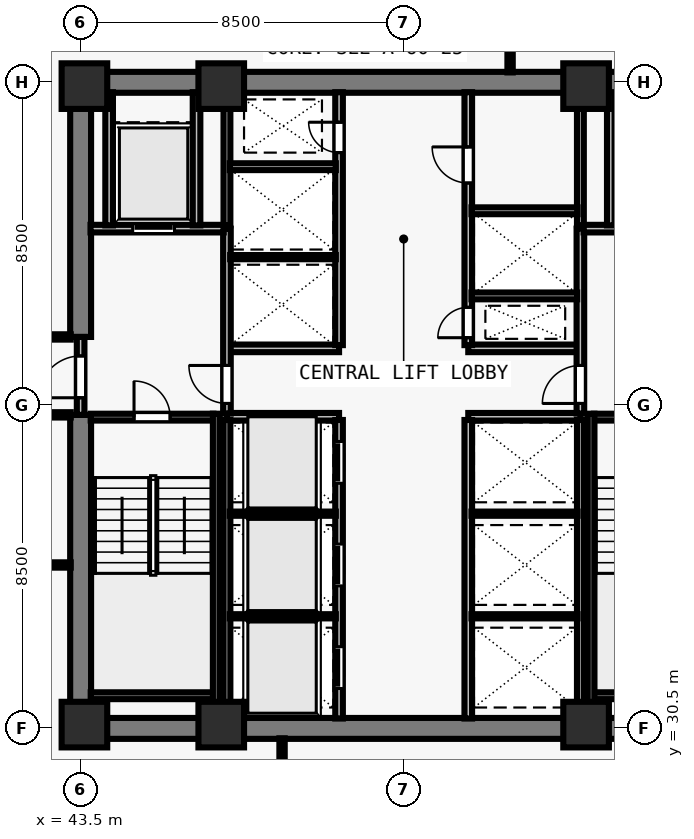
"""IFC4 building model, lengths in metres.
Left out: names, types, materials, properties, quantities, classifications, styles, units other than length and angle.
Written with IfcOpenShell. Run it as: python <this file> out.ifc"""

import sys

from ifc_helpers import new_model, si_unit, direction, frame, frame_2d, origin, origin_2d, place, context, subcontext, project, spatial, rectangle, extrude, element, fill, save


model = new_model("IFC4")
c1 = context("Model", 3, precision=1e-05, world=origin(), true_north=direction((0.0, 1.0)))
c2 = subcontext(c1, "Body", "Model", "MODEL_VIEW")
j1 = project(units=[si_unit("LENGTHUNIT", "METRE"), si_unit("PLANEANGLEUNIT", "RADIAN")], contexts=[c1])
p1 = place(None, origin())
s1 = spatial("IfcSite", under=j1, at=p1, CompositionType="ELEMENT")
p2 = place(p1, origin())
s2 = spatial("IfcBuilding", under=s1, at=p2, CompositionType="ELEMENT")
p3 = place(p2, frame((0.0, 0.0, 83.0)))
s3 = spatial("IfcBuildingStorey", under=s2, at=p3, CompositionType="ELEMENT", Elevation=83.0)
for number, where, z_axis, x_axis in (
    (1, (43.6, 30.6, 0.0), (0.0, 0.0, 1.0), (1.0, 0.0, 0.0)),
    (2, (47.2, 30.6, 0.0), (0.0, 0.0, 1.0), (1.0, 0.0, 0.0)),
    (3, (56.8, 30.6, 0.0), (0.0, 0.0, 1.0), (1.0, 0.0, 0.0)),
    (4, (43.6, 47.4, 0.0), (0.0, 0.0, 1.0), (1.0, 0.0, 0.0)),
    (5, (47.2, 47.4, 0.0), (0.0, 0.0, 1.0), (1.0, 0.0, 0.0)),
    (6, (56.8, 47.4, 0.0), (0.0, 0.0, 1.0), (1.0, 0.0, 0.0)),
):
    element("IfcColumn", number, at=place(p3, frame(where, z_axis=z_axis, x_axis=x_axis)), inside=s3, PredefinedType="COLUMN", context=c2, shape_type="SweptSolid", body=[
        extrude(rectangle(XDim=1.2, YDim=1.2, at=origin_2d()), origin(), (0.0, 0.0, 1.0), 3.5),
    ])
for number, where, z_axis, x_axis in (
    (7, (43.225, 30.5, 0.0), (0.0, 0.0, 1.0), (1.0, 0.0, 0.0)),
    (8, (43.225, 47.5, 0.0), (0.0, 0.0, 1.0), (1.0, 0.0, 0.0)),
):
    element("IfcWall", number, at=place(p3, frame(where, z_axis=z_axis, x_axis=x_axis)), inside=s3, PredefinedType="SHEAR", context=c2, shape_type="SweptSolid", body=[
        extrude(rectangle(XDim=17.55, YDim=0.55, at=frame_2d((8.775, 0.0))), origin(), (0.0, 0.0, 1.0), 3.28),
    ])
p4 = place(p3, frame((43.5, 30.765, 0.0), z_axis=(0.0, 0.0, 1.0), x_axis=(0.0, 1.0, 0.0)))
e9 = element("IfcWall", 9, at=p4, inside=s3, PredefinedType="SHEAR", context=c2, shape_type="SweptSolid", body=[
    extrude(rectangle(XDim=7.985, YDim=0.55, at=frame_2d((3.993, 0.0))), origin(), (0.0, 0.0, 1.0), 3.28),
])
p5 = place(p3, frame((43.5, 40.8, 0.0), z_axis=(0.0, 0.0, 1.0), x_axis=(0.0, 1.0, 0.0)))
e10 = element("IfcWall", 10, at=p5, inside=s3, PredefinedType="SHEAR", context=c2, shape_type="SweptSolid", body=[
    extrude(rectangle(XDim=6.435, YDim=0.55, at=frame_2d((3.218, 0.0))), origin(), (0.0, 0.0, 1.0), 3.28),
])
for number, where, z_axis, x_axis in (
    (11, (47.35, 38.7, 0.0), (0.0, 0.0, 1.0), (1.0, 0.0, 0.0)),
    (12, (47.35, 40.5, 0.0), (0.0, 0.0, 1.0), (1.0, 0.0, 0.0)),
    (13, (53.7, 38.7, 0.0), (0.0, 0.0, 1.0), (1.0, 0.0, 0.0)),
    (14, (53.7, 40.5, 0.0), (0.0, 0.0, 1.0), (1.0, 0.0, 0.0)),
):
    element("IfcWall", number, at=place(p3, frame(where, z_axis=z_axis, x_axis=x_axis)), inside=s3, PredefinedType="SOLIDWALL", context=c2, shape_type="SweptSolid", body=[
        extrude(rectangle(XDim=2.95, YDim=0.2, at=frame_2d((1.475, 0.0))), origin(), (0.0, 0.0, 1.0), 3.28),
    ])
p6 = place(p3, frame((50.3, 30.76, 0.0), z_axis=(0.0, 0.0, 1.0), x_axis=(0.0, 1.0, 0.0)))
e15 = element("IfcWall", 15, at=p6, inside=s3, PredefinedType="SOLIDWALL", context=c2, shape_type="SweptSolid", body=[
    extrude(rectangle(XDim=7.855, YDim=0.2, at=frame_2d((3.927, 0.0))), origin(), (0.0, 0.0, 1.0), 3.28),
])
p7 = place(p6, frame((0.79, 0.0, 0.0)))
e16 = element("IfcOpeningElement", 16, at=p7, cuts=e15, PredefinedType="OPENING", context=c2, shape_type="SweptSolid", body=[
    extrude(rectangle(XDim=1.1, YDim=2.2, at=frame_2d((0.55, 1.1))), frame((0.0, 0.11, 0.0), z_axis=(0.0, -1.0, 0.0), x_axis=(1.0, 0.0, 0.0)), (0.0, 0.0, 1.0), 0.22),
])
p8 = place(p6, frame((3.49, 0.0, 0.0)))
e17 = element("IfcOpeningElement", 17, at=p8, cuts=e15, PredefinedType="OPENING", context=c2, shape_type="SweptSolid", body=[
    extrude(rectangle(XDim=1.1, YDim=2.2, at=frame_2d((0.55, 1.1))), frame((0.0, 0.11, 0.0), z_axis=(0.0, -1.0, 0.0), x_axis=(1.0, 0.0, 0.0)), (0.0, 0.0, 1.0), 0.22),
])
p9 = place(p6, frame((6.19, 0.0, 0.0)))
e18 = element("IfcOpeningElement", 18, at=p9, cuts=e15, PredefinedType="OPENING", context=c2, shape_type="SweptSolid", body=[
    extrude(rectangle(XDim=1.1, YDim=2.2, at=frame_2d((0.55, 1.1))), frame((0.0, 0.11, 0.0), z_axis=(0.0, -1.0, 0.0), x_axis=(1.0, 0.0, 0.0)), (0.0, 0.0, 1.0), 0.22),
])
p10 = place(p3, frame((53.7, 30.76, 0.0), z_axis=(0.0, 0.0, 1.0), x_axis=(0.0, 1.0, 0.0)))
e19 = element("IfcWall", 19, at=p10, inside=s3, PredefinedType="SOLIDWALL", context=c2, shape_type="SweptSolid", body=[
    extrude(rectangle(XDim=7.855, YDim=0.2, at=frame_2d((3.927, 0.0))), origin(), (0.0, 0.0, 1.0), 3.28),
])
p11 = place(p3, frame((50.3, 40.585, 0.0), z_axis=(0.0, 0.0, 1.0), x_axis=(0.0, 1.0, 0.0)))
e20 = element("IfcWall", 20, at=p11, inside=s3, PredefinedType="SOLIDWALL", context=c2, shape_type="SweptSolid", body=[
    extrude(rectangle(XDim=6.655, YDim=0.2, at=frame_2d((3.328, 0.0))), origin(), (0.0, 0.0, 1.0), 3.28),
])
p12 = place(p11, frame((5.065, 0.0, 0.0)))
e21 = element("IfcOpeningElement", 21, at=p12, cuts=e20, PredefinedType="OPENING", context=c2, shape_type="SweptSolid", body=[
    extrude(rectangle(XDim=0.8, YDim=2.08, at=frame_2d((0.4, 1.04))), frame((0.0, 0.11, 0.0), z_axis=(0.0, -1.0, 0.0), x_axis=(1.0, 0.0, 0.0)), (0.0, 0.0, 1.0), 0.22),
])
p13 = place(p3, frame((53.7, 40.585, 0.0), z_axis=(0.0, 0.0, 1.0), x_axis=(0.0, 1.0, 0.0)))
e22 = element("IfcWall", 22, at=p13, inside=s3, PredefinedType="SOLIDWALL", context=c2, shape_type="SweptSolid", body=[
    extrude(rectangle(XDim=6.655, YDim=0.2, at=frame_2d((3.328, 0.0))), origin(), (0.0, 0.0, 1.0), 3.28),
])
p14 = place(p13, frame((0.195, 0.0, 0.0)))
e23 = element("IfcOpeningElement", 23, at=p14, cuts=e22, PredefinedType="OPENING", context=c2, shape_type="SweptSolid", body=[
    extrude(rectangle(XDim=0.8, YDim=2.08, at=frame_2d((0.4, 1.04))), frame((0.0, 0.11, 0.0), z_axis=(0.0, -1.0, 0.0), x_axis=(1.0, 0.0, 0.0)), (0.0, 0.0, 1.0), 0.22),
])
p15 = place(p13, frame((4.265, 0.0, 0.0)))
e24 = element("IfcOpeningElement", 24, at=p15, cuts=e22, PredefinedType="OPENING", context=c2, shape_type="SweptSolid", body=[
    extrude(rectangle(XDim=0.95, YDim=2.12, at=frame_2d((0.475, 1.06))), frame((0.0, 0.11, 0.0), z_axis=(0.0, -1.0, 0.0), x_axis=(1.0, 0.0, 0.0)), (0.0, 0.0, 1.0), 0.22),
])
p16 = place(p3, frame((43.5, 38.75, 0.0), z_axis=(0.0, 0.0, 1.0), x_axis=(0.0, 1.0, 0.0)))
e25 = element("IfcWall", 25, at=p16, inside=s3, PredefinedType="SOLIDWALL", context=c2, shape_type="SweptSolid", body=[
    extrude(rectangle(XDim=2.05, YDim=0.2, at=frame_2d((1.025, 0.0))), origin(), (0.0, 0.0, 1.0), 3.28),
])
p17 = place(p16, frame((0.45, 0.0, 0.0)))
e26 = element("IfcOpeningElement", 26, at=p17, cuts=e25, PredefinedType="OPENING", context=c2, shape_type="SweptSolid", body=[
    extrude(rectangle(XDim=1.1, YDim=2.15, at=frame_2d((0.55, 1.075))), frame((0.0, 0.11, 0.0), z_axis=(0.0, -1.0, 0.0), x_axis=(1.0, 0.0, 0.0)), (0.0, 0.0, 1.0), 0.22),
])
p18 = place(p3, frame((47.35, 38.785, 0.0), z_axis=(0.0, 0.0, 1.0), x_axis=(0.0, 1.0, 0.0)))
e27 = element("IfcWall", 27, at=p18, inside=s3, PredefinedType="SOLIDWALL", context=c2, shape_type="SweptSolid", body=[
    extrude(rectangle(XDim=4.865, YDim=0.2, at=frame_2d((2.433, 0.0))), origin(), (0.0, 0.0, 1.0), 3.28),
])
p19 = place(p18, frame((0.265, 0.0, 0.0)))
e28 = element("IfcOpeningElement", 28, at=p19, cuts=e27, PredefinedType="OPENING", context=c2, shape_type="SweptSolid", body=[
    extrude(rectangle(XDim=1.0, YDim=2.15, at=frame_2d((0.5, 1.075))), frame((0.0, 0.11, 0.0), z_axis=(0.0, -1.0, 0.0), x_axis=(1.0, 0.0, 0.0)), (0.0, 0.0, 1.0), 0.22),
])
p20 = place(p3, frame((43.76, 43.65, 0.0), z_axis=(0.0, 0.0, 1.0), x_axis=(1.0, 0.0, 0.0)))
e29 = element("IfcWall", 29, at=p20, inside=s3, PredefinedType="SOLIDWALL", context=c2, shape_type="SweptSolid", body=[
    extrude(rectangle(XDim=3.505, YDim=0.2, at=frame_2d((1.752, 0.0))), origin(), (0.0, 0.0, 1.0), 3.28),
])
p21 = place(p20, frame((1.11, 0.0, 0.0)))
e30 = element("IfcOpeningElement", 30, at=p21, cuts=e29, PredefinedType="OPENING", context=c2, shape_type="SweptSolid", body=[
    extrude(rectangle(XDim=1.1, YDim=2.2, at=frame_2d((0.55, 1.1))), frame((0.0, 0.11, 0.0), z_axis=(0.0, -1.0, 0.0), x_axis=(1.0, 0.0, 0.0)), (0.0, 0.0, 1.0), 0.22),
])
for number, where, z_axis, x_axis in (
    (31, (46.55, 43.735, 0.0), (0.0, 0.0, 1.0), (0.0, 1.0, 0.0)),
    (32, (44.25, 43.735, 0.0), (0.0, 0.0, 1.0), (0.0, 1.0, 0.0)),
):
    element("IfcWall", number, at=place(p3, frame(where, z_axis=z_axis, x_axis=x_axis)), inside=s3, PredefinedType="SOLIDWALL", context=c2, shape_type="SweptSolid", body=[
        extrude(rectangle(XDim=3.505, YDim=0.2, at=frame_2d((1.752, 0.0))), origin(), (0.0, 0.0, 1.0), 3.28),
    ])
p22 = place(p3, frame((56.65, 38.785, 0.0), z_axis=(0.0, 0.0, 1.0), x_axis=(0.0, 1.0, 0.0)))
e33 = element("IfcWall", 33, at=p22, inside=s3, PredefinedType="SOLIDWALL", context=c2, shape_type="SweptSolid", body=[
    extrude(rectangle(XDim=4.865, YDim=0.2, at=frame_2d((2.433, 0.0))), origin(), (0.0, 0.0, 1.0), 3.28),
])
p23 = place(p22, frame((0.265, 0.0, 0.0)))
e34 = element("IfcOpeningElement", 34, at=p23, cuts=e33, PredefinedType="OPENING", context=c2, shape_type="SweptSolid", body=[
    extrude(rectangle(XDim=1.0, YDim=2.15, at=frame_2d((0.5, 1.075))), frame((0.0, 0.11, 0.0), z_axis=(0.0, -1.0, 0.0), x_axis=(1.0, 0.0, 0.0)), (0.0, 0.0, 1.0), 0.22),
])
p24 = place(p3, frame((56.735, 43.65, 0.0), z_axis=(0.0, 0.0, 1.0), x_axis=(1.0, 0.0, 0.0)))
e35 = element("IfcWall", 35, at=p24, inside=s3, PredefinedType="SOLIDWALL", context=c2, shape_type="SweptSolid", body=[
    extrude(rectangle(XDim=3.505, YDim=0.2, at=frame_2d((1.752, 0.0))), origin(), (0.0, 0.0, 1.0), 3.28),
])
p25 = place(p24, frame((1.295, 0.0, 0.0)))
e36 = element("IfcOpeningElement", 36, at=p25, cuts=e35, PredefinedType="OPENING", context=c2, shape_type="SweptSolid", body=[
    extrude(rectangle(XDim=1.1, YDim=2.2, at=frame_2d((0.55, 1.1))), frame((0.0, 0.11, 0.0), z_axis=(0.0, -1.0, 0.0), x_axis=(1.0, 0.0, 0.0)), (0.0, 0.0, 1.0), 0.22),
])
p26 = place(p3, frame((57.45, 43.735, 0.0), z_axis=(0.0, 0.0, 1.0), x_axis=(0.0, 1.0, 0.0)))
e37 = element("IfcWall", 37, at=p26, inside=s3, PredefinedType="SOLIDWALL", context=c2, shape_type="SweptSolid", body=[
    extrude(rectangle(XDim=3.505, YDim=0.2, at=frame_2d((1.752, 0.0))), origin(), (0.0, 0.0, 1.0), 3.28),
])
p27 = place(p3, frame((47.35, 30.76, 0.0), z_axis=(0.0, 0.0, 1.0), x_axis=(0.0, 1.0, 0.0)))
e38 = element("IfcWall", 38, at=p27, inside=s3, PredefinedType="SOLIDWALL", context=c2, shape_type="SweptSolid", body=[
    extrude(rectangle(XDim=7.855, YDim=0.18, at=frame_2d((3.927, 0.0))), origin(), (0.0, 0.0, 1.0), 3.28),
])
for number, where, z_axis, x_axis in (
    (39, (47.425, 33.45, 0.0), (0.0, 0.0, 1.0), (1.0, 0.0, 0.0)),
    (40, (47.425, 36.15, 0.0), (0.0, 0.0, 1.0), (1.0, 0.0, 0.0)),
):
    element("IfcWall", number, at=place(p3, frame(where, z_axis=z_axis, x_axis=x_axis)), inside=s3, PredefinedType="PARTITIONING", context=c2, shape_type="SweptSolid", body=[
        extrude(rectangle(XDim=2.79, YDim=0.11, at=frame_2d((1.395, 0.0))), origin(), (0.0, 0.0, 1.0), 3.28),
    ])
p28 = place(p3, frame((56.65, 30.76, 0.0), z_axis=(0.0, 0.0, 1.0), x_axis=(0.0, 1.0, 0.0)))
e41 = element("IfcWall", 41, at=p28, inside=s3, PredefinedType="SOLIDWALL", context=c2, shape_type="SweptSolid", body=[
    extrude(rectangle(XDim=7.855, YDim=0.18, at=frame_2d((3.927, 0.0))), origin(), (0.0, 0.0, 1.0), 3.28),
])
for number, where, z_axis, x_axis in (
    (42, (53.785, 33.45, 0.0), (0.0, 0.0, 1.0), (1.0, 0.0, 0.0)),
    (43, (53.785, 36.15, 0.0), (0.0, 0.0, 1.0), (1.0, 0.0, 0.0)),
):
    element("IfcWall", number, at=place(p3, frame(where, z_axis=z_axis, x_axis=x_axis)), inside=s3, PredefinedType="PARTITIONING", context=c2, shape_type="SweptSolid", body=[
        extrude(rectangle(XDim=2.79, YDim=0.11, at=frame_2d((1.395, 0.0))), origin(), (0.0, 0.0, 1.0), 3.28),
    ])
p29 = place(p3, frame((47.35, 43.735, 0.0), z_axis=(0.0, 0.0, 1.0), x_axis=(0.0, 1.0, 0.0)))
e44 = element("IfcWall", 44, at=p29, inside=s3, PredefinedType="SOLIDWALL", context=c2, shape_type="SweptSolid", body=[
    extrude(rectangle(XDim=3.505, YDim=0.18, at=frame_2d((1.752, 0.0))), origin(), (0.0, 0.0, 1.0), 3.28),
])
p30 = place(p3, frame((47.435, 42.9, 0.0), z_axis=(0.0, 0.0, 1.0), x_axis=(1.0, 0.0, 0.0)))
e45 = element("IfcWall", 45, at=p30, inside=s3, PredefinedType="PARTITIONING", context=c2, shape_type="SweptSolid", body=[
    extrude(rectangle(XDim=2.78, YDim=0.11, at=frame_2d((1.39, 0.0))), origin(), (0.0, 0.0, 1.0), 3.28),
])
p31 = place(p3, frame((47.425, 45.28, 0.0), z_axis=(0.0, 0.0, 1.0), x_axis=(1.0, 0.0, 0.0)))
e46 = element("IfcWall", 46, at=p31, inside=s3, PredefinedType="SOLIDWALL", context=c2, shape_type="SweptSolid", body=[
    extrude(rectangle(XDim=2.79, YDim=0.18, at=frame_2d((1.395, 0.0))), origin(), (0.0, 0.0, 1.0), 3.28),
])
p32 = place(p3, frame((56.65, 43.735, 0.0), z_axis=(0.0, 0.0, 1.0), x_axis=(0.0, 1.0, 0.0)))
e47 = element("IfcWall", 47, at=p32, inside=s3, PredefinedType="SOLIDWALL", context=c2, shape_type="SweptSolid", body=[
    extrude(rectangle(XDim=3.505, YDim=0.18, at=frame_2d((1.752, 0.0))), origin(), (0.0, 0.0, 1.0), 3.28),
])
p33 = place(p3, frame((53.785, 41.88, 0.0), z_axis=(0.0, 0.0, 1.0), x_axis=(1.0, 0.0, 0.0)))
e48 = element("IfcWall", 48, at=p33, inside=s3, PredefinedType="SOLIDWALL", context=c2, shape_type="SweptSolid", body=[
    extrude(rectangle(XDim=2.78, YDim=0.18, at=frame_2d((1.39, 0.0))), origin(), (0.0, 0.0, 1.0), 3.28),
])
p34 = place(p3, frame((53.785, 44.12, 0.0), z_axis=(0.0, 0.0, 1.0), x_axis=(1.0, 0.0, 0.0)))
e49 = element("IfcWall", 49, at=p34, inside=s3, PredefinedType="SOLIDWALL", context=c2, shape_type="SweptSolid", body=[
    extrude(rectangle(XDim=2.79, YDim=0.18, at=frame_2d((1.395, 0.0))), origin(), (0.0, 0.0, 1.0), 3.28),
])
for number, where, z_axis, x_axis in (
    (50, (38.855, 38.75, 0.0), (0.0, 0.0, 1.0), (1.0, 0.0, 0.0)),
    (51, (38.855, 40.8, 0.0), (0.0, 0.0, 1.0), (1.0, 0.0, 0.0)),
):
    element("IfcWall", number, at=place(p3, frame(where, z_axis=z_axis, x_axis=x_axis)), inside=s3, PredefinedType="PARTITIONING", context=c2, shape_type="SweptSolid", body=[
        extrude(rectangle(XDim=4.385, YDim=0.14, at=frame_2d((2.192, 0.0))), origin(), (0.0, 0.0, 1.0), 3.28),
    ])
for number, where, z_axis, x_axis in (
    (52, (48.8, 25.555, 0.0), (0.0, 0.0, 1.0), (0.0, 1.0, 0.0)),
    (53, (54.8, 47.76, 0.0), (0.0, 0.0, 1.0), (0.0, 1.0, 0.0)),
):
    element("IfcWall", number, at=place(p3, frame(where, z_axis=z_axis, x_axis=x_axis)), inside=s3, PredefinedType="PARTITIONING", context=c2, shape_type="SweptSolid", body=[
        extrude(rectangle(XDim=4.685, YDim=0.14, at=frame_2d((2.343, 0.0))), origin(), (0.0, 0.0, 1.0), 3.28),
    ])
p35 = place(p3, frame((38.855, 34.8, 0.0), z_axis=(0.0, 0.0, 1.0), x_axis=(1.0, 0.0, 0.0)))
e54 = element("IfcWall", 54, at=p35, inside=s3, PredefinedType="PARTITIONING", context=c2, shape_type="SweptSolid", body=[
    extrude(rectangle(XDim=4.385, YDim=0.14, at=frame_2d((2.192, 0.0))), origin(), (0.0, 0.0, 1.0), 3.28),
])
p36 = place(p3, frame((43.765, 38.69, 0.0), z_axis=(0.0, 0.0, 1.0), x_axis=(1.0, 0.0, 0.0)))
e55 = element("IfcWall", 55, at=p36, inside=s3, PredefinedType="SOLIDWALL", context=c2, shape_type="SweptSolid", body=[
    extrude(rectangle(XDim=3.23, YDim=0.18, at=frame_2d((1.615, 0.0))), origin(), (0.0, 0.0, 1.0), 3.28),
])
p37 = place(p36, frame((1.14, 0.0, 0.0)))
e56 = element("IfcOpeningElement", 56, at=p37, cuts=e55, PredefinedType="OPENING", context=c2, shape_type="SweptSolid", body=[
    extrude(rectangle(XDim=0.95, YDim=2.15, at=frame_2d((0.475, 1.075))), frame((0.0, 0.1, 0.0), z_axis=(0.0, -1.0, 0.0), x_axis=(1.0, 0.0, 0.0)), (0.0, 0.0, 1.0), 0.2),
])
p38 = place(p3, frame((43.765, 31.36, 0.0), z_axis=(0.0, 0.0, 1.0), x_axis=(1.0, 0.0, 0.0)))
e57 = element("IfcWall", 57, at=p38, inside=s3, PredefinedType="SOLIDWALL", context=c2, shape_type="SweptSolid", body=[
    extrude(rectangle(XDim=3.23, YDim=0.18, at=frame_2d((1.615, 0.0))), origin(), (0.0, 0.0, 1.0), 3.28),
])
p39 = place(p3, frame((47.07, 38.78, 0.0), z_axis=(0.0, 0.0, 1.0), x_axis=(0.0, -1.0, 0.0)))
e58 = element("IfcWall", 58, at=p39, inside=s3, PredefinedType="SOLIDWALL", context=c2, shape_type="SweptSolid", body=[
    extrude(rectangle(XDim=8.017, YDim=0.18, at=frame_2d((4.009, 0.0))), origin(), (0.0, 0.0, 1.0), 3.28),
])
p40 = place(p3, frame((57.005, 38.69, 0.0), z_axis=(0.0, 0.0, 1.0), x_axis=(1.0, 0.0, 0.0)))
e59 = element("IfcWall", 59, at=p40, inside=s3, PredefinedType="SOLIDWALL", context=c2, shape_type="SweptSolid", body=[
    extrude(rectangle(XDim=3.23, YDim=0.18, at=frame_2d((1.615, 0.0))), origin(), (0.0, 0.0, 1.0), 3.28),
])
p41 = place(p40, frame((1.14, 0.0, 0.0)))
e60 = element("IfcOpeningElement", 60, at=p41, cuts=e59, PredefinedType="OPENING", context=c2, shape_type="SweptSolid", body=[
    extrude(rectangle(XDim=0.95, YDim=2.15, at=frame_2d((0.475, 1.075))), frame((0.0, 0.1, 0.0), z_axis=(0.0, -1.0, 0.0), x_axis=(1.0, 0.0, 0.0)), (0.0, 0.0, 1.0), 0.2),
])
p42 = place(p3, frame((57.005, 31.36, 0.0), z_axis=(0.0, 0.0, 1.0), x_axis=(1.0, 0.0, 0.0)))
e61 = element("IfcWall", 61, at=p42, inside=s3, PredefinedType="SOLIDWALL", context=c2, shape_type="SweptSolid", body=[
    extrude(rectangle(XDim=3.23, YDim=0.18, at=frame_2d((1.615, 0.0))), origin(), (0.0, 0.0, 1.0), 3.28),
])
p43 = place(p3, frame((56.93, 38.78, 0.0), z_axis=(0.0, 0.0, 1.0), x_axis=(0.0, -1.0, 0.0)))
e62 = element("IfcWall", 62, at=p43, inside=s3, PredefinedType="SOLIDWALL", context=c2, shape_type="SweptSolid", body=[
    extrude(rectangle(XDim=8.017, YDim=0.18, at=frame_2d((4.009, 0.0))), origin(), (0.0, 0.0, 1.0), 3.28),
])
p44 = place(p17, origin())
e63 = element("IfcDoor", 63, at=p44, inside=s3, OperationType="SINGLE_SWING_LEFT", PredefinedType="DOOR", context=c2, shape_type="SweptSolid", body=[
    extrude(rectangle(XDim=1.1, YDim=2.15, at=frame_2d((0.55, 1.075))), frame((0.0, 0.025, 0.0), z_axis=(0.0, -1.0, 0.0), x_axis=(1.0, 0.0, 0.0)), (0.0, 0.0, 1.0), 0.05),
])
fill(e26, e63)
p45 = place(p19, origin())
e64 = element("IfcDoor", 64, at=p45, inside=s3, OperationType="SINGLE_SWING_RIGHT", PredefinedType="DOOR", context=c2, shape_type="SweptSolid", body=[
    extrude(rectangle(XDim=1.0, YDim=2.15, at=frame_2d((0.5, 1.075))), frame((0.0, 0.025, 0.0), z_axis=(0.0, -1.0, 0.0), x_axis=(1.0, 0.0, 0.0)), (0.0, 0.0, 1.0), 0.05),
])
fill(e28, e64)
p46 = place(p21, origin())
e65 = element("IfcDoor", 65, at=p46, inside=s3, OperationType="SLIDING_TO_LEFT", PredefinedType="DOOR", context=c2, shape_type="SweptSolid", body=[
    extrude(rectangle(XDim=1.1, YDim=2.2, at=frame_2d((0.55, 1.1))), frame((0.0, 0.025, 0.0), z_axis=(0.0, -1.0, 0.0), x_axis=(1.0, 0.0, 0.0)), (0.0, 0.0, 1.0), 0.05),
])
fill(e30, e65)
p47 = place(p23, origin())
e66 = element("IfcDoor", 66, at=p47, inside=s3, OperationType="SINGLE_SWING_LEFT", PredefinedType="DOOR", context=c2, shape_type="SweptSolid", body=[
    extrude(rectangle(XDim=1.0, YDim=2.15, at=frame_2d((0.5, 1.075))), frame((0.0, 0.025, 0.0), z_axis=(0.0, -1.0, 0.0), x_axis=(1.0, 0.0, 0.0)), (0.0, 0.0, 1.0), 0.05),
])
fill(e34, e66)
p48 = place(p7, origin())
e67 = element("IfcDoor", 67, at=p48, inside=s3, OperationType="SLIDING_TO_LEFT", PredefinedType="DOOR", context=c2, shape_type="SweptSolid", body=[
    extrude(rectangle(XDim=1.1, YDim=2.2, at=frame_2d((0.55, 1.1))), frame((0.0, 0.025, 0.0), z_axis=(0.0, -1.0, 0.0), x_axis=(1.0, 0.0, 0.0)), (0.0, 0.0, 1.0), 0.05),
])
fill(e16, e67)
p49 = place(p8, origin())
e68 = element("IfcDoor", 68, at=p49, inside=s3, OperationType="SLIDING_TO_LEFT", PredefinedType="DOOR", context=c2, shape_type="SweptSolid", body=[
    extrude(rectangle(XDim=1.1, YDim=2.2, at=frame_2d((0.55, 1.1))), frame((0.0, 0.025, 0.0), z_axis=(0.0, -1.0, 0.0), x_axis=(1.0, 0.0, 0.0)), (0.0, 0.0, 1.0), 0.05),
])
fill(e17, e68)
p50 = place(p9, origin())
e69 = element("IfcDoor", 69, at=p50, inside=s3, OperationType="SLIDING_TO_LEFT", PredefinedType="DOOR", context=c2, shape_type="SweptSolid", body=[
    extrude(rectangle(XDim=1.1, YDim=2.2, at=frame_2d((0.55, 1.1))), frame((0.0, 0.025, 0.0), z_axis=(0.0, -1.0, 0.0), x_axis=(1.0, 0.0, 0.0)), (0.0, 0.0, 1.0), 0.05),
])
fill(e18, e69)
p51 = place(p12, origin())
e70 = element("IfcDoor", 70, at=p51, inside=s3, OperationType="SINGLE_SWING_RIGHT", PredefinedType="DOOR", context=c2, shape_type="SweptSolid", body=[
    extrude(rectangle(XDim=0.8, YDim=2.08, at=frame_2d((0.4, 1.04))), frame((0.0, 0.025, 0.0), z_axis=(0.0, -1.0, 0.0), x_axis=(1.0, 0.0, 0.0)), (0.0, 0.0, 1.0), 0.05),
])
fill(e21, e70)
p52 = place(p14, origin())
e71 = element("IfcDoor", 71, at=p52, inside=s3, OperationType="SINGLE_SWING_LEFT", PredefinedType="DOOR", context=c2, shape_type="SweptSolid", body=[
    extrude(rectangle(XDim=0.8, YDim=2.08, at=frame_2d((0.4, 1.04))), frame((0.0, 0.025, 0.0), z_axis=(0.0, -1.0, 0.0), x_axis=(1.0, 0.0, 0.0)), (0.0, 0.0, 1.0), 0.05),
])
fill(e23, e71)
p53 = place(p15, origin())
e72 = element("IfcDoor", 72, at=p53, inside=s3, OperationType="SINGLE_SWING_RIGHT", PredefinedType="DOOR", context=c2, shape_type="SweptSolid", body=[
    extrude(rectangle(XDim=0.95, YDim=2.12, at=frame_2d((0.475, 1.06))), frame((0.0, 0.025, 0.0), z_axis=(0.0, -1.0, 0.0), x_axis=(1.0, 0.0, 0.0)), (0.0, 0.0, 1.0), 0.05),
])
fill(e24, e72)
p54 = place(p37, origin())
e73 = element("IfcDoor", 73, at=p54, inside=s3, OperationType="SINGLE_SWING_LEFT", PredefinedType="DOOR", context=c2, shape_type="SweptSolid", body=[
    extrude(rectangle(XDim=0.95, YDim=2.15, at=frame_2d((0.475, 1.075))), frame((0.0, 0.025, 0.0), z_axis=(0.0, -1.0, 0.0), x_axis=(1.0, 0.0, 0.0)), (0.0, 0.0, 1.0), 0.05),
])
fill(e56, e73)
save(model, sys.argv[1])
